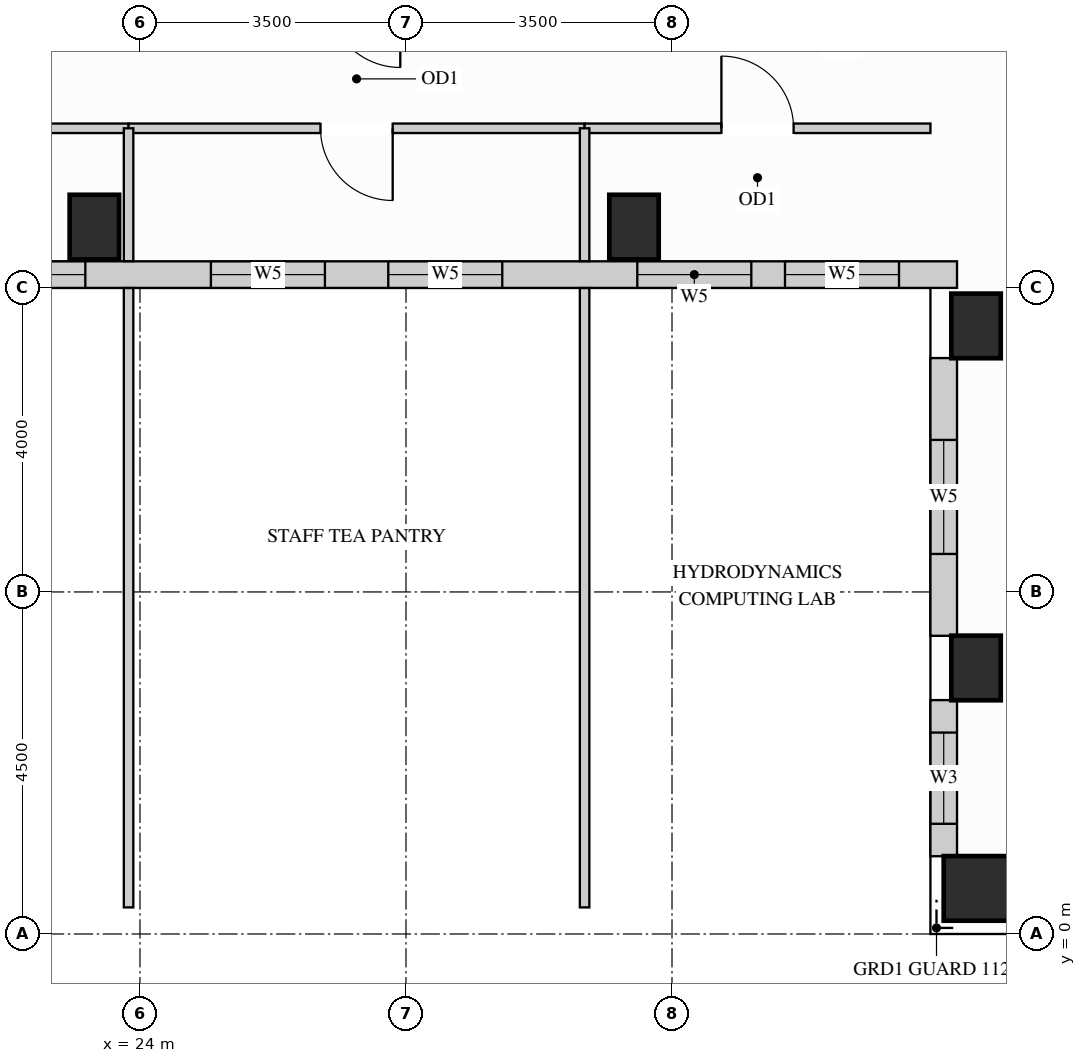
"""IFC4 building model, lengths in metres.
Left out: names, types, materials, properties, quantities, classifications, styles, units other than length and angle.
Written with IfcOpenShell. Run it as: python <this file> out.ifc"""

import sys

from ifc_helpers import new_model, si_unit, direction, frame, frame_2d, origin, origin_2d, place, context, subcontext, project, spatial, rectangle, extrude, source, transform, mapped, element, fill, save


model = new_model("IFC4")
c1 = context("Model", 3, precision=1e-05, world=origin(), true_north=direction((0.0, 1.0)))
c2 = subcontext(c1, "Body", "Model", "MODEL_VIEW")
j1 = project(units=[si_unit("LENGTHUNIT", "METRE"), si_unit("PLANEANGLEUNIT", "RADIAN")], contexts=[c1])
p1 = place(None, origin())
s1 = spatial("IfcSite", under=j1, at=p1, CompositionType="ELEMENT")
p2 = place(p1, origin())
s2 = spatial("IfcBuilding", under=s1, at=p2, CompositionType="ELEMENT")
p3 = place(p2, frame((0.0, 0.0, 230.4)))
s3 = spatial("IfcBuildingStorey", under=s2, at=p3, CompositionType="ELEMENT", Elevation=230.4)
m1 = source(origin(), c2, "Body", "SweptSolid", [
    extrude(rectangle(XDim=0.65, YDim=0.85, at=origin_2d()), origin(), (0.0, 0.0, 1.0), 3.4),
])
for number, where, z_axis, x_axis in (
    (1, (35.0, 3.5, 0.0), (0.0, 0.0, 1.0), (1.0, 0.0, 0.0)),
    (2, (35.0, 8.0, 0.0), (0.0, 0.0, 1.0), (1.0, 0.0, 0.0)),
    (3, (23.4, 9.3, 0.0), (0.0, 0.0, 1.0), (1.0, 0.0, 0.0)),
    (4, (30.5, 9.3, 0.0), (0.0, 0.0, 1.0), (1.0, 0.0, 0.0)),
):
    element("IfcColumn", number, at=place(p3, frame(where, z_axis=z_axis, x_axis=x_axis)), inside=s3, PredefinedType="COLUMN", context=c2, shape_type="MappedRepresentation", body=[
        mapped(m1, transform((0.0, 0.0, 0.0), x_axis=(1.0, 0.0, 0.0), y_axis=(0.0, 1.0, 0.0), z_axis=(0.0, 0.0, 1.0))),
    ])
m2 = source(origin(), c2, "Body", "SweptSolid", [
    extrude(rectangle(XDim=0.85, YDim=0.85, at=origin_2d()), origin(), (0.0, 0.0, 1.0), 3.4),
])
p4 = place(p3, frame((35.0, 0.6, 0.0), z_axis=(0.0, 0.0, 1.0), x_axis=(1.0, 0.0, 0.0)))
e5 = element("IfcColumn", 5, at=p4, inside=s3, PredefinedType="COLUMN", context=c2, shape_type="MappedRepresentation", body=[
    mapped(m2, transform((0.0, 0.0, 0.0), x_axis=(1.0, 0.0, 0.0), y_axis=(0.0, 1.0, 0.0), z_axis=(0.0, 0.0, 1.0))),
])
p5 = place(p3, frame((19.323, 8.675, 0.0), z_axis=(0.0, 0.0, 1.0), x_axis=(1.0, 0.0, 0.0)))
e6 = element("IfcWall", 6, at=p5, inside=s3, PredefinedType="SOLIDWALL", context=c2, shape_type="SweptSolid", body=[
    extrude(rectangle(XDim=15.427, YDim=0.35, at=frame_2d((7.713, 0.0))), origin(), (0.0, 0.0, 1.0), 3.385),
])
p6 = place(p5, frame((0.639, 0.0, 0.78)))
e7 = element("IfcOpeningElement", 7, at=p6, cuts=e6, PredefinedType="OPENING", context=c2, shape_type="SweptSolid", body=[
    extrude(rectangle(XDim=1.5, YDim=2.0, at=frame_2d((0.75, 1.0))), frame((0.0, 0.185, 0.0), z_axis=(0.0, -1.0, 0.0), x_axis=(1.0, 0.0, 0.0)), (0.0, 0.0, 1.0), 0.37),
])
p7 = place(p5, frame((2.458, 0.0, 0.78)))
e8 = element("IfcOpeningElement", 8, at=p7, cuts=e6, PredefinedType="OPENING", context=c2, shape_type="SweptSolid", body=[
    extrude(rectangle(XDim=1.5, YDim=2.0, at=frame_2d((0.75, 1.0))), frame((0.0, 0.185, 0.0), z_axis=(0.0, -1.0, 0.0), x_axis=(1.0, 0.0, 0.0)), (0.0, 0.0, 1.0), 0.37),
])
p8 = place(p5, frame((5.61, 0.0, 0.78)))
e9 = element("IfcOpeningElement", 9, at=p8, cuts=e6, PredefinedType="OPENING", context=c2, shape_type="SweptSolid", body=[
    extrude(rectangle(XDim=1.5, YDim=2.0, at=frame_2d((0.75, 1.0))), frame((0.0, 0.185, 0.0), z_axis=(0.0, -1.0, 0.0), x_axis=(1.0, 0.0, 0.0)), (0.0, 0.0, 1.0), 0.37),
])
p9 = place(p5, frame((7.944, 0.0, 0.78)))
e10 = element("IfcOpeningElement", 10, at=p9, cuts=e6, PredefinedType="OPENING", context=c2, shape_type="SweptSolid", body=[
    extrude(rectangle(XDim=1.5, YDim=2.0, at=frame_2d((0.75, 1.0))), frame((0.0, 0.185, 0.0), z_axis=(0.0, -1.0, 0.0), x_axis=(1.0, 0.0, 0.0)), (0.0, 0.0, 1.0), 0.37),
])
p10 = place(p5, frame((11.22, 0.0, 0.78)))
e11 = element("IfcOpeningElement", 11, at=p10, cuts=e6, PredefinedType="OPENING", context=c2, shape_type="SweptSolid", body=[
    extrude(rectangle(XDim=1.5, YDim=2.0, at=frame_2d((0.75, 1.0))), frame((0.0, 0.185, 0.0), z_axis=(0.0, -1.0, 0.0), x_axis=(1.0, 0.0, 0.0)), (0.0, 0.0, 1.0), 0.37),
])
p11 = place(p5, frame((13.164, 0.0, 0.78)))
e12 = element("IfcOpeningElement", 12, at=p11, cuts=e6, PredefinedType="OPENING", context=c2, shape_type="SweptSolid", body=[
    extrude(rectangle(XDim=1.5, YDim=2.0, at=frame_2d((0.75, 1.0))), frame((0.0, 0.185, 0.0), z_axis=(0.0, -1.0, 0.0), x_axis=(1.0, 0.0, 0.0)), (0.0, 0.0, 1.0), 0.37),
])
p12 = place(p3, frame((34.575, 7.577, 0.0), z_axis=(0.0, 0.0, 1.0), x_axis=(0.0, -1.0, 0.0)))
e13 = element("IfcWall", 13, at=p12, inside=s3, PredefinedType="SOLIDWALL", context=c2, shape_type="SweptSolid", body=[
    extrude(rectangle(XDim=3.654, YDim=0.35, at=frame_2d((1.827, 0.0))), origin(), (0.0, 0.0, 1.0), 3.385),
])
p13 = place(p12, frame((1.077, 0.0, 0.78)))
e14 = element("IfcOpeningElement", 14, at=p13, cuts=e13, PredefinedType="OPENING", context=c2, shape_type="SweptSolid", body=[
    extrude(rectangle(XDim=1.5, YDim=2.0, at=frame_2d((0.75, 1.0))), frame((0.0, 0.185, 0.0), z_axis=(0.0, -1.0, 0.0), x_axis=(1.0, 0.0, 0.0)), (0.0, 0.0, 1.0), 0.37),
])
p14 = place(p3, frame((34.575, 3.077, 0.0), z_axis=(0.0, 0.0, 1.0), x_axis=(0.0, -1.0, 0.0)))
e15 = element("IfcWall", 15, at=p14, inside=s3, PredefinedType="SOLIDWALL", context=c2, shape_type="SweptSolid", body=[
    extrude(rectangle(XDim=2.054, YDim=0.35, at=frame_2d((1.027, 0.0))), origin(), (0.0, 0.0, 1.0), 3.385),
])
p15 = place(p14, frame((0.427, 0.0, 0.78)))
e16 = element("IfcOpeningElement", 16, at=p15, cuts=e15, PredefinedType="OPENING", context=c2, shape_type="SweptSolid", body=[
    extrude(rectangle(XDim=1.2, YDim=2.0, at=frame_2d((0.6, 1.0))), frame((0.0, 0.185, 0.0), z_axis=(0.0, -1.0, 0.0), x_axis=(1.0, 0.0, 0.0)), (0.0, 0.0, 1.0), 0.37),
])
p16 = place(p3, frame((19.5, 10.6, 0.0), z_axis=(0.0, 0.0, 1.0), x_axis=(1.0, 0.0, 0.0)))
e17 = element("IfcWall", 17, at=p16, inside=s3, PredefinedType="PARTITIONING", context=c2, shape_type="SweptSolid", body=[
    extrude(rectangle(XDim=4.35, YDim=0.125, at=frame_2d((2.175, 0.0))), origin(), (0.0, 0.0, 1.0), 3.385),
])
p17 = place(p16, frame((1.7, 0.0, 0.0)))
e18 = element("IfcOpeningElement", 18, at=p17, cuts=e17, PredefinedType="OPENING", context=c2, shape_type="SweptSolid", body=[
    extrude(rectangle(XDim=0.95, YDim=2.15, at=frame_2d((0.475, 1.075))), frame((0.0, 0.073, 0.0), z_axis=(0.0, -1.0, 0.0), x_axis=(1.0, 0.0, 0.0)), (0.0, 0.0, 1.0), 0.145),
])
p18 = place(p3, frame((23.85, 10.6, 0.0), z_axis=(0.0, 0.0, 1.0), x_axis=(1.0, 0.0, 0.0)))
e19 = element("IfcWall", 19, at=p18, inside=s3, PredefinedType="PARTITIONING", context=c2, shape_type="SweptSolid", body=[
    extrude(rectangle(XDim=6.0, YDim=0.125, at=frame_2d((3.0, 0.0))), origin(), (0.0, 0.0, 1.0), 3.385),
])
p19 = place(p18, frame((2.525, 0.0, 0.0)))
e20 = element("IfcOpeningElement", 20, at=p19, cuts=e19, PredefinedType="OPENING", context=c2, shape_type="SweptSolid", body=[
    extrude(rectangle(XDim=0.95, YDim=2.15, at=frame_2d((0.475, 1.075))), frame((0.0, 0.073, 0.0), z_axis=(0.0, -1.0, 0.0), x_axis=(1.0, 0.0, 0.0)), (0.0, 0.0, 1.0), 0.145),
])
p20 = place(p3, frame((29.85, 10.6, 0.0), z_axis=(0.0, 0.0, 1.0), x_axis=(1.0, 0.0, 0.0)))
e21 = element("IfcWall", 21, at=p20, inside=s3, PredefinedType="PARTITIONING", context=c2, shape_type="SweptSolid", body=[
    extrude(rectangle(XDim=4.55, YDim=0.125, at=frame_2d((2.275, 0.0))), origin(), (0.0, 0.0, 1.0), 3.385),
])
p21 = place(p20, frame((1.8, 0.0, 0.0)))
e22 = element("IfcOpeningElement", 22, at=p21, cuts=e21, PredefinedType="OPENING", context=c2, shape_type="SweptSolid", body=[
    extrude(rectangle(XDim=0.95, YDim=2.15, at=frame_2d((0.475, 1.075))), frame((0.0, 0.073, 0.0), z_axis=(0.0, -1.0, 0.0), x_axis=(1.0, 0.0, 0.0)), (0.0, 0.0, 1.0), 0.145),
])
m3 = source(origin(), c2, "Body", "SweptSolid", [
    extrude(rectangle(XDim=8.148, YDim=0.125, at=frame_2d((4.074, 0.0))), origin(), (0.0, 0.0, 1.0), 3.385),
])
p22 = place(p3, frame((23.85, 0.35, 0.0), z_axis=(0.0, 0.0, 1.0), x_axis=(0.0, 1.0, 0.0)))
e23 = element("IfcWall", 23, at=p22, inside=s3, PredefinedType="PARTITIONING", context=c2, shape_type="MappedRepresentation", body=[
    mapped(m3, transform((0.0, 0.0, 0.0), x_axis=(1.0, 0.0, 0.0), y_axis=(0.0, 1.0, 0.0), z_axis=(0.0, 0.0, 1.0))),
])
m4 = source(origin(), c2, "Body", "SweptSolid", [
    extrude(rectangle(XDim=1.748, YDim=0.125, at=frame_2d((0.874, 0.0))), origin(), (0.0, 0.0, 1.0), 3.385),
])
p23 = place(p3, frame((23.85, 8.852, 0.0), z_axis=(0.0, 0.0, 1.0), x_axis=(0.0, 1.0, 0.0)))
e24 = element("IfcWall", 24, at=p23, inside=s3, PredefinedType="PARTITIONING", context=c2, shape_type="MappedRepresentation", body=[
    mapped(m4, transform((0.0, 0.0, 0.0), x_axis=(1.0, 0.0, 0.0), y_axis=(0.0, 1.0, 0.0), z_axis=(0.0, 0.0, 1.0))),
])
p24 = place(p3, frame((29.85, 0.35, 0.0), z_axis=(0.0, 0.0, 1.0), x_axis=(0.0, 1.0, 0.0)))
e25 = element("IfcWall", 25, at=p24, inside=s3, PredefinedType="PARTITIONING", context=c2, shape_type="MappedRepresentation", body=[
    mapped(m3, transform((0.0, 0.0, 0.0), x_axis=(1.0, 0.0, 0.0), y_axis=(0.0, 1.0, 0.0), z_axis=(0.0, 0.0, 1.0))),
])
p25 = place(p3, frame((29.85, 8.852, 0.0), z_axis=(0.0, 0.0, 1.0), x_axis=(0.0, 1.0, 0.0)))
e26 = element("IfcWall", 26, at=p25, inside=s3, PredefinedType="PARTITIONING", context=c2, shape_type="MappedRepresentation", body=[
    mapped(m4, transform((0.0, 0.0, 0.0), x_axis=(1.0, 0.0, 0.0), y_axis=(0.0, 1.0, 0.0), z_axis=(0.0, 0.0, 1.0))),
])
m5 = source(origin(), c2, "Body", "SweptSolid", [
    extrude(rectangle(XDim=0.95, YDim=2.15, at=frame_2d((0.475, 1.075))), frame((0.0, 0.025, 0.0), z_axis=(0.0, -1.0, 0.0), x_axis=(1.0, 0.0, 0.0)), (0.0, 0.0, 1.0), 0.05),
])
p26 = place(p19, origin())
e27 = element("IfcDoor", 27, at=p26, inside=s3, OperationType="SINGLE_SWING_RIGHT", PredefinedType="DOOR", context=c2, shape_type="MappedRepresentation", body=[
    mapped(m5, transform((0.0, 0.0, 0.0), x_axis=(1.0, 0.0, 0.0), y_axis=(0.0, 1.0, 0.0), z_axis=(0.0, 0.0, 1.0))),
])
fill(e20, e27)
p27 = place(p21, origin())
e28 = element("IfcDoor", 28, at=p27, inside=s3, OperationType="SINGLE_SWING_LEFT", PredefinedType="DOOR", context=c2, shape_type="MappedRepresentation", body=[
    mapped(m5, transform((0.0, 0.0, 0.0), x_axis=(1.0, 0.0, 0.0), y_axis=(0.0, 1.0, 0.0), z_axis=(0.0, 0.0, 1.0))),
])
fill(e22, e28)
m6 = source(origin(), c2, "Body", "SweptSolid", [
    extrude(rectangle(XDim=1.2, YDim=2.0, at=frame_2d((0.6, 1.0))), frame((0.0, 0.03, 0.0), z_axis=(0.0, -1.0, 0.0), x_axis=(1.0, 0.0, 0.0)), (0.0, 0.0, 1.0), 0.06),
])
p28 = place(p15, origin())
e29 = element("IfcWindow", 29, at=p28, inside=s3, PartitioningType="SINGLE_PANEL", PredefinedType="WINDOW", context=c2, shape_type="MappedRepresentation", body=[
    mapped(m6, transform((0.0, 0.0, 0.0), x_axis=(1.0, 0.0, 0.0), y_axis=(0.0, 1.0, 0.0), z_axis=(0.0, 0.0, 1.0))),
])
fill(e16, e29)
m7 = source(origin(), c2, "Body", "SweptSolid", [
    extrude(rectangle(XDim=1.5, YDim=2.0, at=frame_2d((0.75, 1.0))), frame((0.0, 0.03, 0.0), z_axis=(0.0, -1.0, 0.0), x_axis=(1.0, 0.0, 0.0)), (0.0, 0.0, 1.0), 0.06),
])
p29 = place(p7, origin())
e30 = element("IfcWindow", 30, at=p29, inside=s3, PartitioningType="SINGLE_PANEL", PredefinedType="WINDOW", context=c2, shape_type="MappedRepresentation", body=[
    mapped(m7, transform((0.0, 0.0, 0.0), x_axis=(1.0, 0.0, 0.0), y_axis=(0.0, 1.0, 0.0), z_axis=(0.0, 0.0, 1.0))),
])
fill(e8, e30)
p30 = place(p8, origin())
e31 = element("IfcWindow", 31, at=p30, inside=s3, PartitioningType="SINGLE_PANEL", PredefinedType="WINDOW", context=c2, shape_type="MappedRepresentation", body=[
    mapped(m7, transform((0.0, 0.0, 0.0), x_axis=(1.0, 0.0, 0.0), y_axis=(0.0, 1.0, 0.0), z_axis=(0.0, 0.0, 1.0))),
])
fill(e9, e31)
p31 = place(p9, origin())
e32 = element("IfcWindow", 32, at=p31, inside=s3, PartitioningType="SINGLE_PANEL", PredefinedType="WINDOW", context=c2, shape_type="MappedRepresentation", body=[
    mapped(m7, transform((0.0, 0.0, 0.0), x_axis=(1.0, 0.0, 0.0), y_axis=(0.0, 1.0, 0.0), z_axis=(0.0, 0.0, 1.0))),
])
fill(e10, e32)
p32 = place(p10, origin())
e33 = element("IfcWindow", 33, at=p32, inside=s3, PartitioningType="SINGLE_PANEL", PredefinedType="WINDOW", context=c2, shape_type="MappedRepresentation", body=[
    mapped(m7, transform((0.0, 0.0, 0.0), x_axis=(1.0, 0.0, 0.0), y_axis=(0.0, 1.0, 0.0), z_axis=(0.0, 0.0, 1.0))),
])
fill(e11, e33)
p33 = place(p11, origin())
e34 = element("IfcWindow", 34, at=p33, inside=s3, PartitioningType="SINGLE_PANEL", PredefinedType="WINDOW", context=c2, shape_type="MappedRepresentation", body=[
    mapped(m7, transform((0.0, 0.0, 0.0), x_axis=(1.0, 0.0, 0.0), y_axis=(0.0, 1.0, 0.0), z_axis=(0.0, 0.0, 1.0))),
])
fill(e12, e34)
p34 = place(p13, origin())
e35 = element("IfcWindow", 35, at=p34, inside=s3, PartitioningType="SINGLE_PANEL", PredefinedType="WINDOW", context=c2, shape_type="MappedRepresentation", body=[
    mapped(m7, transform((0.0, 0.0, 0.0), x_axis=(1.0, 0.0, 0.0), y_axis=(0.0, 1.0, 0.0), z_axis=(0.0, 0.0, 1.0))),
])
fill(e14, e35)
save(model, sys.argv[1])
